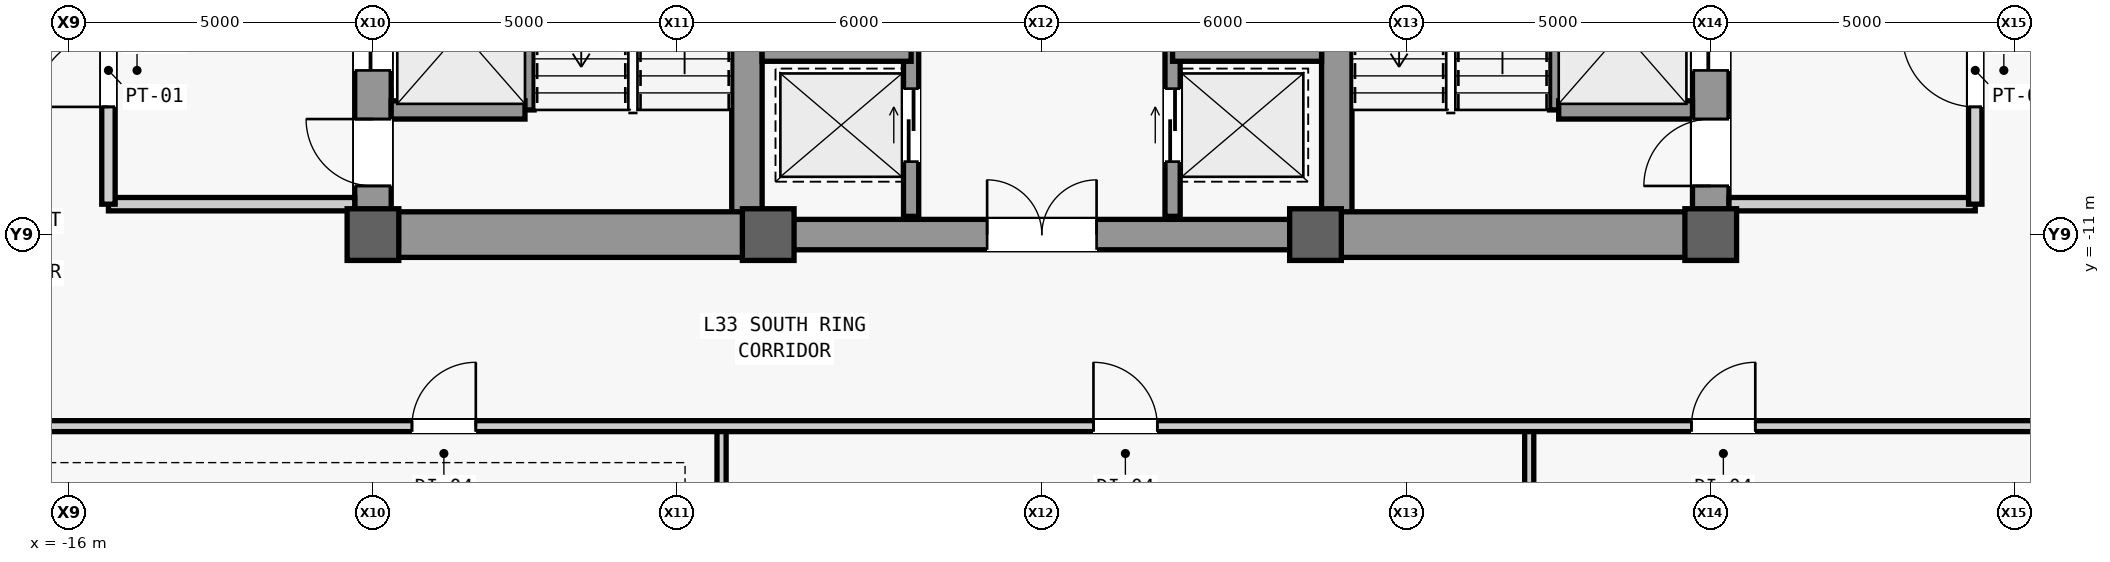
"""IFC4 building model, lengths in metres.
Left out: names, types, materials, properties, quantities, classifications, styles, units other than length and angle.
Written with IfcOpenShell. Run it as: python <this file> out.ifc"""

import sys

from ifc_helpers import new_model, si_unit, direction, frame, frame_2d, origin, origin_2d, place, context, subcontext, project, spatial, rectangle, extrude, source, transform, mapped, element, fill, save


model = new_model("IFC4")
c1 = context("Model", 3, precision=1e-05, world=origin(), true_north=direction((0.0, 1.0)))
c2 = subcontext(c1, "Body", "Model", "MODEL_VIEW")
j1 = project(units=[si_unit("LENGTHUNIT", "METRE"), si_unit("PLANEANGLEUNIT", "RADIAN")], contexts=[c1])
p1 = place(None, origin())
s1 = spatial("IfcSite", under=j1, at=p1, CompositionType="ELEMENT")
p2 = place(p1, origin())
s2 = spatial("IfcBuilding", under=s1, at=p2, CompositionType="ELEMENT")
p3 = place(p2, frame((0.0, 0.0, 144.7)))
s3 = spatial("IfcBuildingStorey", under=s2, at=p3, CompositionType="ELEMENT", Elevation=144.7)
m1 = source(origin(), c2, "Body", "SweptSolid", [
    extrude(rectangle(XDim=22.0, YDim=0.6, at=frame_2d((11.0, 0.0))), origin(), (0.0, 0.0, 1.0), 4.6),
])
p4 = place(p3, frame((-11.0, -11.0, 0.0), z_axis=(0.0, 0.0, 1.0), x_axis=(0.0, 1.0, 0.0)))
e1 = element("IfcWall", 1, at=p4, inside=s3, PredefinedType="SHEAR", context=c2, shape_type="MappedRepresentation", body=[
    mapped(m1, transform((0.0, 0.0, 0.0), scale=1.0)),
])
m2 = source(origin(), c2, "Body", "SweptSolid", [
    extrude(rectangle(XDim=1.1, YDim=2.2, at=frame_2d((0.55, 1.1))), frame((0.0, 0.31, 0.0), z_axis=(0.0, -1.0, 0.0), x_axis=(1.0, 0.0, 0.0)), (0.0, 0.0, 1.0), 0.62),
])
p5 = place(p4, frame((0.8, 0.0, 0.0)))
e2 = element("IfcOpeningElement", 2, at=p5, cuts=e1, PredefinedType="OPENING", context=c2, shape_type="MappedRepresentation", body=[
    mapped(m2, transform((0.0, 0.0, 0.0), scale=1.0)),
])
p6 = place(p4, frame((12.5, 0.0, 0.0)))
e3 = element("IfcOpeningElement", 3, at=p6, cuts=e1, PredefinedType="OPENING", context=c2, shape_type="MappedRepresentation", body=[
    mapped(m2, transform((0.0, 0.0, 0.0), scale=1.0)),
])
m3 = source(origin(), c2, "Body", "SweptSolid", [
    extrude(rectangle(XDim=0.9, YDim=2.15, at=frame_2d((0.45, 1.075))), frame((0.0, 0.31, 0.0), z_axis=(0.0, -1.0, 0.0), x_axis=(1.0, 0.0, 0.0)), (0.0, 0.0, 1.0), 0.62),
])
p7 = place(p4, frame((6.85, 0.0, 0.0)))
e4 = element("IfcOpeningElement", 4, at=p7, cuts=e1, PredefinedType="OPENING", context=c2, shape_type="MappedRepresentation", body=[
    mapped(m3, transform((0.0, 0.0, 0.0), scale=1.0)),
])
m4 = source(origin(), c2, "Body", "SweptSolid", [
    extrude(rectangle(XDim=1.2, YDim=2.3, at=frame_2d((0.6, 1.15))), frame((0.0, 0.31, 0.0), z_axis=(0.0, -1.0, 0.0), x_axis=(1.0, 0.0, 0.0)), (0.0, 0.0, 1.0), 0.62),
])
p8 = place(p4, frame((14.6, 0.0, 0.0)))
e5 = element("IfcOpeningElement", 5, at=p8, cuts=e1, PredefinedType="OPENING", context=c2, shape_type="MappedRepresentation", body=[
    mapped(m4, transform((0.0, 0.0, 0.0), scale=1.0)),
])
p9 = place(p4, frame((18.2, 0.0, 0.0)))
e6 = element("IfcOpeningElement", 6, at=p9, cuts=e1, PredefinedType="OPENING", context=c2, shape_type="MappedRepresentation", body=[
    mapped(m4, transform((0.0, 0.0, 0.0), scale=1.0)),
])
m5 = source(origin(), c2, "Body", "SweptSolid", [
    extrude(rectangle(XDim=1.3, YDim=2.3, at=frame_2d((0.65, 1.15))), frame((0.0, 0.31, 0.0), z_axis=(0.0, -1.0, 0.0), x_axis=(1.0, 0.0, 0.0)), (0.0, 0.0, 1.0), 0.62),
])
p10 = place(p4, frame((2.7, 0.0, 0.0)))
e7 = element("IfcOpeningElement", 7, at=p10, cuts=e1, PredefinedType="OPENING", context=c2, shape_type="MappedRepresentation", body=[
    mapped(m5, transform((0.0, 0.0, 0.0), scale=1.0)),
])
p11 = place(p3, frame((11.0, -11.0, 0.0), z_axis=(0.0, 0.0, 1.0), x_axis=(0.0, 1.0, 0.0)))
e8 = element("IfcWall", 8, at=p11, inside=s3, PredefinedType="SHEAR", context=c2, shape_type="MappedRepresentation", body=[
    mapped(m1, transform((0.0, 0.0, 0.0), scale=1.0)),
])
p12 = place(p11, frame((0.8, 0.0, 0.0)))
e9 = element("IfcOpeningElement", 9, at=p12, cuts=e8, PredefinedType="OPENING", context=c2, shape_type="MappedRepresentation", body=[
    mapped(m2, transform((0.0, 0.0, 0.0), scale=1.0)),
])
p13 = place(p11, frame((6.2, 0.0, 0.0)))
e10 = element("IfcOpeningElement", 10, at=p13, cuts=e8, PredefinedType="OPENING", context=c2, shape_type="MappedRepresentation", body=[
    mapped(m3, transform((0.0, 0.0, 0.0), scale=1.0)),
])
p14 = place(p11, frame((8.05, 0.0, 0.0)))
e11 = element("IfcOpeningElement", 11, at=p14, cuts=e8, PredefinedType="OPENING", context=c2, shape_type="MappedRepresentation", body=[
    mapped(m3, transform((0.0, 0.0, 0.0), scale=1.0)),
])
p15 = place(p11, frame((2.7, 0.0, 0.0)))
e12 = element("IfcOpeningElement", 12, at=p15, cuts=e8, PredefinedType="OPENING", context=c2, shape_type="MappedRepresentation", body=[
    mapped(m5, transform((0.0, 0.0, 0.0), scale=1.0)),
])
p16 = place(p11, frame((13.35, 0.0, 0.0)))
e13 = element("IfcOpeningElement", 13, at=p16, cuts=e8, PredefinedType="OPENING", context=c2, shape_type="MappedRepresentation", body=[
    mapped(m5, transform((0.0, 0.0, 0.0), scale=1.0)),
])
m6 = source(origin(), c2, "Body", "SweptSolid", [
    extrude(rectangle(XDim=21.4, YDim=0.5, at=frame_2d((10.7, 0.0))), origin(), (0.0, 0.0, 1.0), 4.6),
])
for number, where, z_axis, x_axis in (
    (14, (-4.85, -10.7, 0.0), (0.0, 0.0, 1.0), (0.0, 1.0, 0.0)),
    (15, (4.85, -10.7, 0.0), (0.0, 0.0, 1.0), (0.0, 1.0, 0.0)),
):
    element("IfcWall", number, at=place(p3, frame(where, z_axis=z_axis, x_axis=x_axis)), inside=s3, PredefinedType="SHEAR", context=c2, shape_type="MappedRepresentation", body=[
        mapped(m6, transform((0.0, 0.0, 0.0), scale=1.0)),
    ])
m7 = source(origin(), c2, "Body", "SweptSolid", [
    extrude(rectangle(XDim=5.85, YDim=0.75, at=frame_2d((2.925, 0.0))), origin(), (0.0, 0.0, 1.0), 4.6),
])
for number, where, z_axis, x_axis in (
    (16, (-10.7, -11.0, 0.0), (0.0, 0.0, 1.0), (1.0, 0.0, 0.0)),
    (17, (4.85, -11.0, 0.0), (0.0, 0.0, 1.0), (1.0, 0.0, 0.0)),
):
    element("IfcWall", number, at=place(p3, frame(where, z_axis=z_axis, x_axis=x_axis)), inside=s3, PredefinedType="SHEAR", context=c2, shape_type="MappedRepresentation", body=[
        mapped(m7, transform((0.0, 0.0, 0.0), scale=1.0)),
    ])
m8 = source(origin(), c2, "Body", "SweptSolid", [
    extrude(rectangle(XDim=9.2, YDim=0.5, at=frame_2d((4.6, 0.0))), origin(), (0.0, 0.0, 1.0), 4.6),
])
p17 = place(p3, frame((-4.6, -11.0, 0.0), z_axis=(0.0, 0.0, 1.0), x_axis=(1.0, 0.0, 0.0)))
e18 = element("IfcWall", 18, at=p17, inside=s3, PredefinedType="SHEAR", context=c2, shape_type="MappedRepresentation", body=[
    mapped(m8, transform((0.0, 0.0, 0.0), scale=1.0)),
])
m9 = source(origin(), c2, "Body", "SweptSolid", [
    extrude(rectangle(XDim=1.8, YDim=2.25, at=frame_2d((0.9, 1.125))), frame((0.0, 0.26, 0.0), z_axis=(0.0, -1.0, 0.0), x_axis=(1.0, 0.0, 0.0)), (0.0, 0.0, 1.0), 0.52),
])
p18 = place(p17, frame((3.7, 0.0, 0.0)))
e19 = element("IfcOpeningElement", 19, at=p18, cuts=e18, PredefinedType="OPENING", context=c2, shape_type="MappedRepresentation", body=[
    mapped(m9, transform((0.0, 0.0, 0.0), scale=1.0)),
])
m10 = source(origin(), c2, "Body", "SweptSolid", [
    extrude(rectangle(XDim=0.85, YDim=0.85, at=origin_2d()), origin(), (0.0, 0.0, 1.0), 5.2),
])
for number, where, z_axis, x_axis in (
    (20, (-11.0, -11.0, 0.0), (0.0, 0.0, 1.0), (1.0, 0.0, 0.0)),
    (21, (-4.5, -11.0, 0.0), (0.0, 0.0, 1.0), (1.0, 0.0, 0.0)),
    (22, (4.5, -11.0, 0.0), (0.0, 0.0, 1.0), (1.0, 0.0, 0.0)),
    (23, (11.0, -11.0, 0.0), (0.0, 0.0, 1.0), (1.0, 0.0, 0.0)),
):
    element("IfcColumn", number, at=place(p3, frame(where, z_axis=z_axis, x_axis=x_axis)), inside=s3, PredefinedType="COLUMN", context=c2, shape_type="MappedRepresentation", body=[
        mapped(m10, transform((0.0, 0.0, 0.0), scale=1.0)),
    ])
m11 = source(origin(), c2, "Body", "SweptSolid", [
    extrude(rectangle(XDim=7.8, YDim=0.3, at=frame_2d((3.9, 0.0))), origin(), (0.0, 0.0, 1.0), 4.6),
])
p19 = place(p3, frame((-8.5, -8.95, 0.0), z_axis=(0.0, 0.0, 1.0), x_axis=(0.0, 1.0, 0.0)))
e24 = element("IfcWall", 24, at=p19, inside=s3, PredefinedType="SHEAR", context=c2, shape_type="MappedRepresentation", body=[
    mapped(m11, transform((0.0, 0.0, 0.0), scale=1.0)),
])
m12 = source(origin(), c2, "Body", "SweptSolid", [
    extrude(rectangle(XDim=2.2, YDim=0.3, at=frame_2d((1.1, 0.0))), origin(), (0.0, 0.0, 1.0), 4.6),
])
p20 = place(p3, frame((-10.7, -8.95, 0.0), z_axis=(0.0, 0.0, 1.0), x_axis=(1.0, 0.0, 0.0)))
e25 = element("IfcWall", 25, at=p20, inside=s3, PredefinedType="SHEAR", context=c2, shape_type="MappedRepresentation", body=[
    mapped(m12, transform((0.0, 0.0, 0.0), scale=1.0)),
])
p21 = place(p3, frame((8.5, -8.95, 0.0), z_axis=(0.0, 0.0, 1.0), x_axis=(0.0, 1.0, 0.0)))
e26 = element("IfcWall", 26, at=p21, inside=s3, PredefinedType="SHEAR", context=c2, shape_type="MappedRepresentation", body=[
    mapped(m11, transform((0.0, 0.0, 0.0), scale=1.0)),
])
p22 = place(p3, frame((8.5, -8.95, 0.0), z_axis=(0.0, 0.0, 1.0), x_axis=(1.0, 0.0, 0.0)))
e27 = element("IfcWall", 27, at=p22, inside=s3, PredefinedType="SHEAR", context=c2, shape_type="MappedRepresentation", body=[
    mapped(m12, transform((0.0, 0.0, 0.0), scale=1.0)),
])
m13 = source(origin(), c2, "Body", "SweptSolid", [
    extrude(rectangle(XDim=4.05, YDim=0.22, at=frame_2d((2.025, 0.0))), origin(), (0.0, 0.0, 1.0), 4.6),
])
p23 = place(p3, frame((-15.35, -10.5, 0.0), z_axis=(0.0, 0.0, 1.0), x_axis=(1.0, 0.0, 0.0)))
e28 = element("IfcWall", 28, at=p23, inside=s3, PredefinedType="PARTITIONING", context=c2, shape_type="MappedRepresentation", body=[
    mapped(m13, transform((0.0, 0.0, 0.0), scale=1.0)),
])
m14 = source(origin(), c2, "Body", "SweptSolid", [
    extrude(rectangle(XDim=4.4, YDim=0.22, at=frame_2d((2.2, 0.0))), origin(), (0.0, 0.0, 1.0), 4.6),
])
p24 = place(p3, frame((-15.35, -10.5, 0.0), z_axis=(0.0, 0.0, 1.0), x_axis=(0.0, 1.0, 0.0)))
e29 = element("IfcWall", 29, at=p24, inside=s3, PredefinedType="PARTITIONING", context=c2, shape_type="MappedRepresentation", body=[
    mapped(m14, transform((0.0, 0.0, 0.0), scale=1.0)),
])
m15 = source(origin(), c2, "Body", "SweptSolid", [
    extrude(rectangle(XDim=1.2, YDim=2.2, at=frame_2d((0.6, 1.1))), frame((0.0, 0.12, 0.0), z_axis=(0.0, -1.0, 0.0), x_axis=(1.0, 0.0, 0.0)), (0.0, 0.0, 1.0), 0.24),
])
p25 = place(p24, frame((1.6, 0.0, 0.0)))
e30 = element("IfcOpeningElement", 30, at=p25, cuts=e29, PredefinedType="OPENING", context=c2, shape_type="MappedRepresentation", body=[
    mapped(m15, transform((0.0, 0.0, 0.0), scale=1.0)),
])
p26 = place(p3, frame((11.3, -10.5, 0.0), z_axis=(0.0, 0.0, 1.0), x_axis=(1.0, 0.0, 0.0)))
e31 = element("IfcWall", 31, at=p26, inside=s3, PredefinedType="PARTITIONING", context=c2, shape_type="MappedRepresentation", body=[
    mapped(m13, transform((0.0, 0.0, 0.0), scale=1.0)),
])
p27 = place(p3, frame((15.35, -10.5, 0.0), z_axis=(0.0, 0.0, 1.0), x_axis=(0.0, 1.0, 0.0)))
e32 = element("IfcWall", 32, at=p27, inside=s3, PredefinedType="PARTITIONING", context=c2, shape_type="MappedRepresentation", body=[
    mapped(m14, transform((0.0, 0.0, 0.0), scale=1.0)),
])
p28 = place(p27, frame((1.6, 0.0, 0.0)))
e33 = element("IfcOpeningElement", 33, at=p28, cuts=e32, PredefinedType="OPENING", context=c2, shape_type="MappedRepresentation", body=[
    mapped(m15, transform((0.0, 0.0, 0.0), scale=1.0)),
])
m16 = source(origin(), c2, "Body", "SweptSolid", [
    extrude(rectangle(XDim=5.4, YDim=0.25, at=frame_2d((2.7, 0.0))), origin(), (0.0, 0.0, 1.0), 4.6),
])
p29 = place(p3, frame((-2.15, -10.7, 0.0), z_axis=(0.0, 0.0, 1.0), x_axis=(0.0, 1.0, 0.0)))
e34 = element("IfcWall", 34, at=p29, inside=s3, PredefinedType="SHEAR", context=c2, shape_type="MappedRepresentation", body=[
    mapped(m16, transform((0.0, 0.0, 0.0), scale=1.0)),
])
m17 = source(origin(), c2, "Body", "SweptSolid", [
    extrude(rectangle(XDim=1.2, YDim=2.3, at=frame_2d((0.6, 1.15))), frame((0.0, 0.135, 0.0), z_axis=(0.0, -1.0, 0.0), x_axis=(1.0, 0.0, 0.0)), (0.0, 0.0, 1.0), 0.27),
])
p30 = place(p29, frame((0.9, 0.0, 0.0)))
e35 = element("IfcOpeningElement", 35, at=p30, cuts=e34, PredefinedType="OPENING", context=c2, shape_type="MappedRepresentation", body=[
    mapped(m17, transform((0.0, 0.0, 0.0), scale=1.0)),
])
p31 = place(p29, frame((3.2, 0.0, 0.0)))
e36 = element("IfcOpeningElement", 36, at=p31, cuts=e34, PredefinedType="OPENING", context=c2, shape_type="MappedRepresentation", body=[
    mapped(m17, transform((0.0, 0.0, 0.0), scale=1.0)),
])
p32 = place(p3, frame((2.15, -10.7, 0.0), z_axis=(0.0, 0.0, 1.0), x_axis=(0.0, 1.0, 0.0)))
e37 = element("IfcWall", 37, at=p32, inside=s3, PredefinedType="SHEAR", context=c2, shape_type="MappedRepresentation", body=[
    mapped(m16, transform((0.0, 0.0, 0.0), scale=1.0)),
])
p33 = place(p32, frame((0.9, 0.0, 0.0)))
e38 = element("IfcOpeningElement", 38, at=p33, cuts=e37, PredefinedType="OPENING", context=c2, shape_type="MappedRepresentation", body=[
    mapped(m17, transform((0.0, 0.0, 0.0), scale=1.0)),
])
p34 = place(p32, frame((3.2, 0.0, 0.0)))
e39 = element("IfcOpeningElement", 39, at=p34, cuts=e37, PredefinedType="OPENING", context=c2, shape_type="MappedRepresentation", body=[
    mapped(m17, transform((0.0, 0.0, 0.0), scale=1.0)),
])
m18 = source(origin(), c2, "Body", "SweptSolid", [
    extrude(rectangle(XDim=2.45, YDim=0.2, at=frame_2d((1.225, 0.0))), origin(), (0.0, 0.0, 1.0), 4.6),
])
for number, where, z_axis, x_axis in (
    (40, (-4.6, -8.05, 0.0), (0.0, 0.0, 1.0), (1.0, 0.0, 0.0)),
    (41, (2.15, -8.05, 0.0), (0.0, 0.0, 1.0), (1.0, 0.0, 0.0)),
):
    element("IfcWall", number, at=place(p3, frame(where, z_axis=z_axis, x_axis=x_axis)), inside=s3, PredefinedType="SHEAR", context=c2, shape_type="MappedRepresentation", body=[
        mapped(m18, transform((0.0, 0.0, 0.0), scale=1.0)),
    ])
m19 = source(origin(), c2, "Body", "SweptSolid", [
    extrude(rectangle(XDim=17.85, YDim=0.15, at=frame_2d((8.925, 0.0))), origin(), (0.0, 0.0, 1.0), 4.6),
])
for number, where, z_axis, x_axis in (
    (42, (-5.268, -32.0, 0.0), (0.0, 0.0, 1.0), (0.0, 1.0, 0.0)),
    (43, (8.015, -32.0, 0.0), (0.0, 0.0, 1.0), (0.0, 1.0, 0.0)),
):
    element("IfcWall", number, at=place(p3, frame(where, z_axis=z_axis, x_axis=x_axis)), inside=s3, PredefinedType="PARTITIONING", context=c2, shape_type="MappedRepresentation", body=[
        mapped(m19, transform((0.0, 0.0, 0.0), scale=1.0)),
    ])
m20 = source(origin(), c2, "Body", "SweptSolid", [
    extrude(rectangle(XDim=37.95, YDim=0.18, at=frame_2d((18.975, 0.0))), origin(), (0.0, 0.0, 1.0), 4.6),
])
p35 = place(p3, frame((-18.55, -14.15, 0.0), z_axis=(0.0, 0.0, 1.0), x_axis=(1.0, 0.0, 0.0)))
e44 = element("IfcWall", 44, at=p35, inside=s3, PredefinedType="PARTITIONING", context=c2, shape_type="MappedRepresentation", body=[
    mapped(m20, transform((0.0, 0.0, 0.0), scale=1.0)),
])
m21 = source(origin(), c2, "Body", "SweptSolid", [
    extrude(rectangle(XDim=1.05, YDim=2.2, at=frame_2d((0.525, 1.1))), frame((0.0, 0.1, 0.0), z_axis=(0.0, -1.0, 0.0), x_axis=(1.0, 0.0, 0.0)), (0.0, 0.0, 1.0), 0.2),
])
p36 = place(p35, frame((8.191, 0.0, 0.0)))
e45 = element("IfcOpeningElement", 45, at=p36, cuts=e44, PredefinedType="OPENING", context=c2, shape_type="MappedRepresentation", body=[
    mapped(m21, transform((0.0, 0.0, 0.0), scale=1.0)),
])
p37 = place(p35, frame((19.399, 0.0, 0.0)))
e46 = element("IfcOpeningElement", 46, at=p37, cuts=e44, PredefinedType="OPENING", context=c2, shape_type="MappedRepresentation", body=[
    mapped(m21, transform((0.0, 0.0, 0.0), scale=1.0)),
])
p38 = place(p35, frame((29.232, 0.0, 0.0)))
e47 = element("IfcOpeningElement", 47, at=p38, cuts=e44, PredefinedType="OPENING", context=c2, shape_type="MappedRepresentation", body=[
    mapped(m21, transform((0.0, 0.0, 0.0), scale=1.0)),
])
m22 = source(origin(), c2, "Body", "SweptSolid", [
    extrude(rectangle(XDim=1.1, YDim=2.2, at=frame_2d((0.55, 1.1))), frame((0.0, 0.025, 0.0), z_axis=(0.0, -1.0, 0.0), x_axis=(1.0, 0.0, 0.0)), (0.0, 0.0, 1.0), 0.05),
])
p39 = place(p5, origin())
e48 = element("IfcDoor", 48, at=p39, inside=s3, OperationType="SINGLE_SWING_RIGHT", PredefinedType="DOOR", context=c2, shape_type="MappedRepresentation", body=[
    mapped(m22, transform((0.0, 0.0, 0.0), scale=1.0)),
])
fill(e2, e48)
p40 = place(p12, origin())
e49 = element("IfcDoor", 49, at=p40, inside=s3, OperationType="SINGLE_SWING_LEFT", PredefinedType="DOOR", context=c2, shape_type="MappedRepresentation", body=[
    mapped(m22, transform((0.0, 0.0, 0.0), scale=1.0)),
])
fill(e9, e49)
m23 = source(origin(), c2, "Body", "SweptSolid", [
    extrude(rectangle(XDim=1.2, YDim=2.2, at=frame_2d((0.6, 1.1))), frame((0.0, 0.025, 0.0), z_axis=(0.0, -1.0, 0.0), x_axis=(1.0, 0.0, 0.0)), (0.0, 0.0, 1.0), 0.05),
])
p41 = place(p25, origin())
e50 = element("IfcDoor", 50, at=p41, inside=s3, OperationType="SINGLE_SWING_LEFT", PredefinedType="DOOR", context=c2, shape_type="MappedRepresentation", body=[
    mapped(m23, transform((0.0, 0.0, 0.0), scale=1.0)),
])
fill(e30, e50)
p42 = place(p28, origin())
e51 = element("IfcDoor", 51, at=p42, inside=s3, OperationType="SINGLE_SWING_RIGHT", PredefinedType="DOOR", context=c2, shape_type="MappedRepresentation", body=[
    mapped(m23, transform((0.0, 0.0, 0.0), scale=1.0)),
])
fill(e33, e51)
m24 = source(origin(), c2, "Body", "SweptSolid", [
    extrude(rectangle(XDim=1.8, YDim=2.25, at=frame_2d((0.9, 1.125))), frame((0.0, 0.025, 0.0), z_axis=(0.0, -1.0, 0.0), x_axis=(1.0, 0.0, 0.0)), (0.0, 0.0, 1.0), 0.05),
])
p43 = place(p18, origin())
e52 = element("IfcDoor", 52, at=p43, inside=s3, OperationType="SINGLE_SWING_LEFT", PredefinedType="DOOR", context=c2, shape_type="MappedRepresentation", body=[
    mapped(m24, transform((0.0, 0.0, 0.0), scale=1.0)),
])
fill(e19, e52)
m25 = source(origin(), c2, "Body", "SweptSolid", [
    extrude(rectangle(XDim=1.05, YDim=2.2, at=frame_2d((0.525, 1.1))), frame((0.0, 0.025, 0.0), z_axis=(0.0, -1.0, 0.0), x_axis=(1.0, 0.0, 0.0)), (0.0, 0.0, 1.0), 0.05),
])
p44 = place(p36, origin())
e53 = element("IfcDoor", 53, at=p44, inside=s3, OperationType="SINGLE_SWING_RIGHT", PredefinedType="DOOR", context=c2, shape_type="MappedRepresentation", body=[
    mapped(m25, transform((0.0, 0.0, 0.0), scale=1.0)),
])
fill(e45, e53)
p45 = place(p37, origin())
e54 = element("IfcDoor", 54, at=p45, inside=s3, OperationType="SINGLE_SWING_LEFT", PredefinedType="DOOR", context=c2, shape_type="MappedRepresentation", body=[
    mapped(m25, transform((0.0, 0.0, 0.0), scale=1.0)),
])
fill(e46, e54)
p46 = place(p38, origin())
e55 = element("IfcDoor", 55, at=p46, inside=s3, OperationType="SINGLE_SWING_RIGHT", PredefinedType="DOOR", context=c2, shape_type="MappedRepresentation", body=[
    mapped(m25, transform((0.0, 0.0, 0.0), scale=1.0)),
])
fill(e47, e55)
m26 = source(origin(), c2, "Body", "SweptSolid", [
    extrude(rectangle(XDim=1.2, YDim=2.3, at=frame_2d((0.6, 1.15))), frame((0.0, 0.025, 0.0), z_axis=(0.0, -1.0, 0.0), x_axis=(1.0, 0.0, 0.0)), (0.0, 0.0, 1.0), 0.05),
])
p47 = place(p30, origin())
e56 = element("IfcDoor", 56, at=p47, inside=s3, OperationType="SLIDING_TO_LEFT", PredefinedType="DOOR", context=c2, shape_type="MappedRepresentation", body=[
    mapped(m26, transform((0.0, 0.0, 0.0), scale=1.0)),
])
fill(e35, e56)
p48 = place(p33, origin())
e57 = element("IfcDoor", 57, at=p48, inside=s3, OperationType="SLIDING_TO_LEFT", PredefinedType="DOOR", context=c2, shape_type="MappedRepresentation", body=[
    mapped(m26, transform((0.0, 0.0, 0.0), scale=1.0)),
])
fill(e38, e57)
m27 = source(origin(), c2, "Body", "SweptSolid", [
    extrude(rectangle(XDim=1.3, YDim=2.3, at=frame_2d((0.65, 1.15))), frame((0.0, 0.025, 0.0), z_axis=(0.0, -1.0, 0.0), x_axis=(1.0, 0.0, 0.0)), (0.0, 0.0, 1.0), 0.05),
])
p49 = place(p10, origin())
e58 = element("IfcDoor", 58, at=p49, inside=s3, OperationType="SLIDING_TO_LEFT", PredefinedType="DOOR", context=c2, shape_type="MappedRepresentation", body=[
    mapped(m27, transform((0.0, 0.0, 0.0), scale=1.0)),
])
fill(e7, e58)
p50 = place(p15, origin())
e59 = element("IfcDoor", 59, at=p50, inside=s3, OperationType="SLIDING_TO_LEFT", PredefinedType="DOOR", context=c2, shape_type="MappedRepresentation", body=[
    mapped(m27, transform((0.0, 0.0, 0.0), scale=1.0)),
])
fill(e12, e59)
save(model, sys.argv[1])
